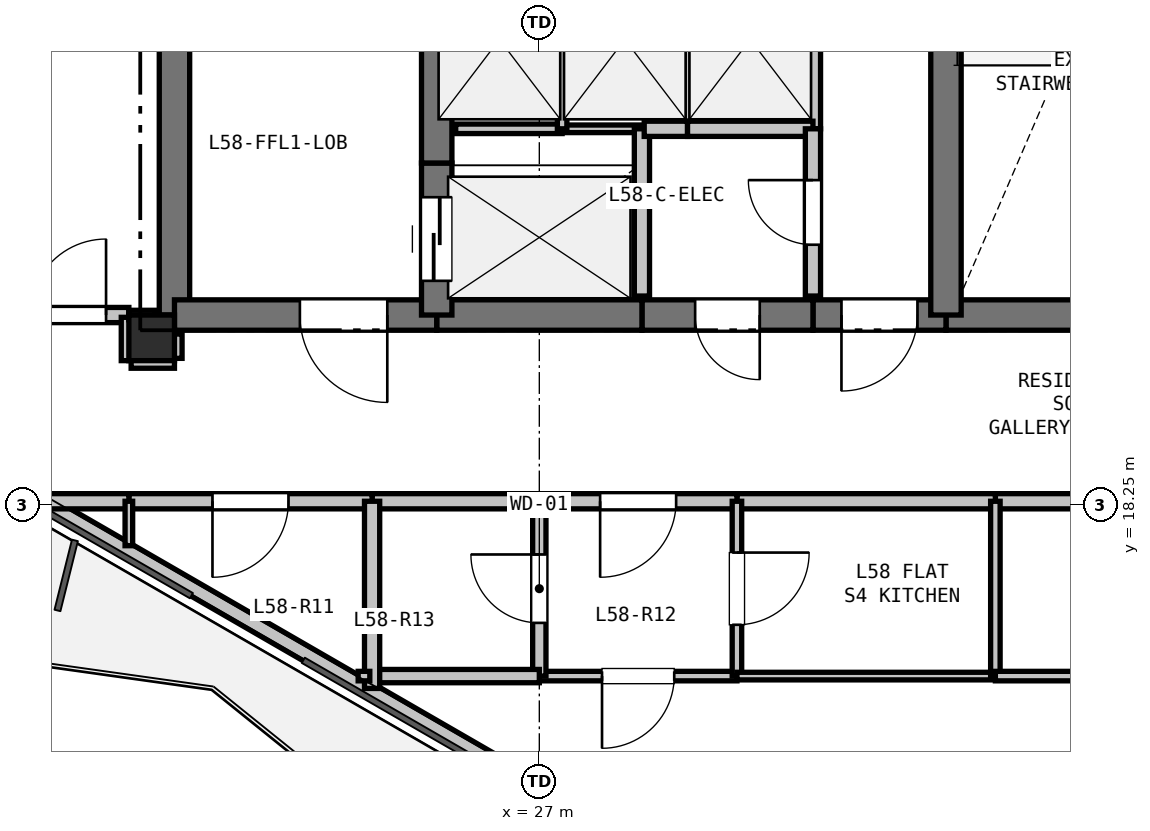
"""IFC4 building model, lengths in metres.
Left out: names, types, materials, properties, quantities, classifications, styles, units other than length and angle.
Written with IfcOpenShell. Run it as: python <this file> out.ifc"""

import sys

from ifc_helpers import new_model, si_unit, direction, frame, frame_2d, origin, origin_2d, place, context, subcontext, project, spatial, rectangle, extrude, element, fill, save


model = new_model("IFC4")
c1 = context("Model", 3, precision=1e-05, world=origin(), true_north=direction((0.0, 1.0)))
c2 = subcontext(c1, "Body", "Model", "MODEL_VIEW")
j1 = project(units=[si_unit("LENGTHUNIT", "METRE"), si_unit("PLANEANGLEUNIT", "RADIAN")], contexts=[c1])
p1 = place(None, origin())
s1 = spatial("IfcSite", under=j1, at=p1, CompositionType="ELEMENT")
p2 = place(p1, origin())
s2 = spatial("IfcBuilding", under=s1, at=p2, CompositionType="ELEMENT")
p3 = place(p2, frame((0.0, 0.0, 208.5)))
s3 = spatial("IfcBuildingStorey", under=s2, at=p3, CompositionType="ELEMENT", Elevation=208.5)
p4 = place(p3, frame((21.9, 20.45, 0.0), z_axis=(0.0, 0.0, 1.0), x_axis=(1.0, 0.0, 0.0)))
e1 = element("IfcColumn", 1, at=p4, inside=s3, PredefinedType="COLUMN", context=c2, shape_type="SweptSolid", body=[
    extrude(rectangle(XDim=0.6, YDim=0.6, at=origin_2d()), origin(), (0.0, 0.0, 1.0), 3.3),
])
p5 = place(p3, frame((27.102, 14.464, 0.0), z_axis=(0.0, 0.0, 1.0), x_axis=(-0.866020680503, 0.500008180874, 0.0)))
e2 = element("IfcWall", 2, at=p5, inside=s3, PredefinedType="PARAPET", context=c2, shape_type="SweptSolid", body=[
    extrude(rectangle(XDim=8.999, YDim=0.2, at=frame_2d((4.5, 0.0))), origin(), (0.0, 0.0, 1.0), 0.2),
])
p6 = place(p3, frame((22.2, 20.75, 0.0), z_axis=(0.0, 0.0, 1.0), x_axis=(0.0, 1.0, 0.0)))
e3 = element("IfcWall", 3, at=p6, inside=s3, PredefinedType="SHEAR", context=c2, shape_type="SweptSolid", body=[
    extrude(rectangle(XDim=4.65, YDim=0.4, at=frame_2d((2.325, 0.0))), origin(), (0.0, 0.0, 1.0), 3.07),
])
p7 = place(p3, frame((35.8, 20.75, 0.0), z_axis=(0.0, 0.0, 1.0), x_axis=(-1.0, 0.0, 0.0)))
e4 = element("IfcWall", 4, at=p7, inside=s3, PredefinedType="SHEAR", context=c2, shape_type="SweptSolid", body=[
    extrude(rectangle(XDim=3.45, YDim=0.4, at=frame_2d((1.725, 0.0))), origin(), (0.0, 0.0, 1.0), 3.07),
])
p8 = place(p3, frame((32.35, 20.75, 0.0), z_axis=(0.0, 0.0, 1.0), x_axis=(-1.0, 0.0, 0.0)))
e5 = element("IfcWall", 5, at=p8, inside=s3, PredefinedType="SHEAR", context=c2, shape_type="SweptSolid", body=[
    extrude(rectangle(XDim=1.75, YDim=0.4, at=frame_2d((0.875, 0.0))), origin(), (0.0, 0.0, 1.0), 3.07),
])
p9 = place(p8, frame((0.375, 0.0, 0.0)))
e6 = element("IfcOpeningElement", 6, at=p9, cuts=e5, PredefinedType="OPENING", context=c2, shape_type="SweptSolid", body=[
    extrude(rectangle(XDim=1.0, YDim=2.15, at=frame_2d((0.5, 1.075))), frame((0.0, 0.21, 0.0), z_axis=(0.0, -1.0, 0.0), x_axis=(1.0, 0.0, 0.0)), (0.0, 0.0, 1.0), 0.42),
])
p10 = place(p3, frame((30.6, 20.75, 0.0), z_axis=(0.0, 0.0, 1.0), x_axis=(-1.0, 0.0, 0.0)))
e7 = element("IfcWall", 7, at=p10, inside=s3, PredefinedType="SHEAR", context=c2, shape_type="SweptSolid", body=[
    extrude(rectangle(XDim=2.25, YDim=0.4, at=frame_2d((1.125, 0.0))), origin(), (0.0, 0.0, 1.0), 3.07),
])
p11 = place(p10, frame((0.7, 0.0, 0.0)))
e8 = element("IfcOpeningElement", 8, at=p11, cuts=e7, PredefinedType="OPENING", context=c2, shape_type="SweptSolid", body=[
    extrude(rectangle(XDim=0.85, YDim=2.1, at=frame_2d((0.425, 1.05))), frame((0.0, 0.21, 0.0), z_axis=(0.0, -1.0, 0.0), x_axis=(1.0, 0.0, 0.0)), (0.0, 0.0, 1.0), 0.42),
])
p12 = place(p3, frame((28.35, 20.75, 0.0), z_axis=(0.0, 0.0, 1.0), x_axis=(-1.0, 0.0, 0.0)))
e9 = element("IfcWall", 9, at=p12, inside=s3, PredefinedType="SHEAR", context=c2, shape_type="SweptSolid", body=[
    extrude(rectangle(XDim=2.7, YDim=0.4, at=frame_2d((1.35, 0.0))), origin(), (0.0, 0.0, 1.0), 3.07),
])
p13 = place(p3, frame((25.65, 20.75, 0.0), z_axis=(0.0, 0.0, 1.0), x_axis=(-1.0, 0.0, 0.0)))
e10 = element("IfcWall", 10, at=p13, inside=s3, PredefinedType="SHEAR", context=c2, shape_type="SweptSolid", body=[
    extrude(rectangle(XDim=3.45, YDim=0.4, at=frame_2d((1.725, 0.0))), origin(), (0.0, 0.0, 1.0), 3.07),
])
p14 = place(p13, frame((0.65, 0.0, 0.0)))
e11 = element("IfcOpeningElement", 11, at=p14, cuts=e10, PredefinedType="OPENING", context=c2, shape_type="SweptSolid", body=[
    extrude(rectangle(XDim=1.15, YDim=2.15, at=frame_2d((0.575, 1.075))), frame((0.0, 0.21, 0.0), z_axis=(0.0, -1.0, 0.0), x_axis=(1.0, 0.0, 0.0)), (0.0, 0.0, 1.0), 0.42),
])
p15 = place(p3, frame((25.65, 20.75, 0.0), z_axis=(0.0, 0.0, 1.0), x_axis=(0.0, 1.0, 0.0)))
e12 = element("IfcWall", 12, at=p15, inside=s3, PredefinedType="SHEAR", context=c2, shape_type="SweptSolid", body=[
    extrude(rectangle(XDim=2.0, YDim=0.4, at=frame_2d((1.0, 0.0))), origin(), (0.0, 0.0, 1.0), 3.07),
])
p16 = place(p15, frame((0.45, 0.0, 0.0)))
e13 = element("IfcOpeningElement", 13, at=p16, cuts=e12, PredefinedType="OPENING", context=c2, shape_type="SweptSolid", body=[
    extrude(rectangle(XDim=1.1, YDim=2.15, at=frame_2d((0.55, 1.075))), frame((0.0, 0.21, 0.0), z_axis=(0.0, -1.0, 0.0), x_axis=(1.0, 0.0, 0.0)), (0.0, 0.0, 1.0), 0.42),
])
p17 = place(p3, frame((25.65, 22.75, 0.0), z_axis=(0.0, 0.0, 1.0), x_axis=(0.0, 1.0, 0.0)))
e14 = element("IfcWall", 14, at=p17, inside=s3, PredefinedType="SHEAR", context=c2, shape_type="SweptSolid", body=[
    extrude(rectangle(XDim=2.8, YDim=0.4, at=frame_2d((1.4, 0.0))), origin(), (0.0, 0.0, 1.0), 3.07),
])
p18 = place(p3, frame((32.35, 20.75, 0.0), z_axis=(0.0, 0.0, 1.0), x_axis=(0.0, 1.0, 0.0)))
e15 = element("IfcWall", 15, at=p18, inside=s3, PredefinedType="SHEAR", context=c2, shape_type="SweptSolid", body=[
    extrude(rectangle(XDim=4.8, YDim=0.4, at=frame_2d((2.4, 0.0))), origin(), (0.0, 0.0, 1.0), 3.07),
])
p19 = place(p3, frame((25.9, 23.2, 0.0), z_axis=(0.0, 0.0, 1.0), x_axis=(1.0, 0.0, 0.0)))
e16 = element("IfcWall", 16, at=p19, inside=s3, PredefinedType="PARTITIONING", context=c2, shape_type="SweptSolid", body=[
    extrude(rectangle(XDim=1.4, YDim=0.125, at=frame_2d((0.7, 0.0))), origin(), (0.0, 0.0, 1.0), 3.07),
])
p20 = place(p3, frame((27.3, 23.2, 0.0), z_axis=(0.0, 0.0, 1.0), x_axis=(1.0, 0.0, 0.0)))
e17 = element("IfcWall", 17, at=p20, inside=s3, PredefinedType="PARTITIONING", context=c2, shape_type="SweptSolid", body=[
    extrude(rectangle(XDim=1.05, YDim=0.1, at=frame_2d((0.525, 0.0))), origin(), (0.0, 0.0, 1.0), 3.07),
])
p21 = place(p3, frame((28.35, 23.2, 0.0), z_axis=(0.0, 0.0, 1.0), x_axis=(0.0, -1.0, 0.0)))
e18 = element("IfcWall", 18, at=p21, inside=s3, PredefinedType="PARTITIONING", context=c2, shape_type="SweptSolid", body=[
    extrude(rectangle(XDim=2.2, YDim=0.2, at=frame_2d((1.1, 0.0))), origin(), (0.0, 0.0, 1.0), 3.07),
])
p22 = place(p3, frame((27.3, 25.4, 0.0), z_axis=(0.0, 0.0, 1.0), x_axis=(0.0, -1.0, 0.0)))
e19 = element("IfcWall", 19, at=p22, inside=s3, PredefinedType="PARTITIONING", context=c2, shape_type="SweptSolid", body=[
    extrude(rectangle(XDim=2.2, YDim=0.125, at=frame_2d((1.1, 0.0))), origin(), (0.0, 0.0, 1.0), 3.07),
])
p23 = place(p3, frame((28.95, 25.4, 0.0), z_axis=(0.0, 0.0, 1.0), x_axis=(0.0, -1.0, 0.0)))
e20 = element("IfcWall", 20, at=p23, inside=s3, PredefinedType="PARTITIONING", context=c2, shape_type="SweptSolid", body=[
    extrude(rectangle(XDim=2.2, YDim=0.1, at=frame_2d((1.1, 0.0))), origin(), (0.0, 0.0, 1.0), 3.07),
])
p24 = place(p3, frame((28.95, 23.2, 0.0), z_axis=(0.0, 0.0, 1.0), x_axis=(-1.0, 0.0, 0.0)))
e21 = element("IfcWall", 21, at=p24, inside=s3, PredefinedType="PARTITIONING", context=c2, shape_type="SweptSolid", body=[
    extrude(rectangle(XDim=0.57, YDim=0.2, at=frame_2d((0.285, 0.0))), origin(), (0.0, 0.0, 1.0), 3.07),
])
p25 = place(p3, frame((30.6, 25.4, 0.0), z_axis=(0.0, 0.0, 1.0), x_axis=(0.0, -1.0, 0.0)))
e22 = element("IfcWall", 22, at=p25, inside=s3, PredefinedType="PARTITIONING", context=c2, shape_type="SweptSolid", body=[
    extrude(rectangle(XDim=2.2, YDim=0.2, at=frame_2d((1.1, 0.0))), origin(), (0.0, 0.0, 1.0), 3.07),
])
p26 = place(p3, frame((30.6, 23.2, 0.0), z_axis=(0.0, 0.0, 1.0), x_axis=(-1.0, 0.0, 0.0)))
e23 = element("IfcWall", 23, at=p26, inside=s3, PredefinedType="PARTITIONING", context=c2, shape_type="SweptSolid", body=[
    extrude(rectangle(XDim=1.65, YDim=0.2, at=frame_2d((0.825, 0.0))), origin(), (0.0, 0.0, 1.0), 3.07),
])
p27 = place(p3, frame((30.6, 21.0, 0.0), z_axis=(0.0, 0.0, 1.0), x_axis=(0.0, 1.0, 0.0)))
e24 = element("IfcWall", 24, at=p27, inside=s3, PredefinedType="PARTITIONING", context=c2, shape_type="SweptSolid", body=[
    extrude(rectangle(XDim=2.2, YDim=0.2, at=frame_2d((1.1, 0.0))), origin(), (0.0, 0.0, 1.0), 3.07),
])
p28 = place(p27, frame((0.675, 0.0, 0.0)))
e25 = element("IfcOpeningElement", 25, at=p28, cuts=e24, PredefinedType="OPENING", context=c2, shape_type="SweptSolid", body=[
    extrude(rectangle(XDim=0.85, YDim=2.1, at=frame_2d((0.425, 1.05))), frame((0.0, 0.11, 0.0), z_axis=(0.0, -1.0, 0.0), x_axis=(1.0, 0.0, 0.0)), (0.0, 0.0, 1.0), 0.22),
])
p29 = place(p3, frame((20.0, 20.75, 0.0), z_axis=(0.0, 0.0, 1.0), x_axis=(1.0, 0.0, 0.0)))
e26 = element("IfcWall", 26, at=p29, inside=s3, PredefinedType="PARTITIONING", context=c2, shape_type="SweptSolid", body=[
    extrude(rectangle(XDim=1.6, YDim=0.2, at=frame_2d((0.8, 0.0))), origin(), (0.0, 0.0, 1.0), 2.518),
])
p30 = place(p29, frame((0.3, 0.0, 0.0)))
e27 = element("IfcOpeningElement", 27, at=p30, cuts=e26, PredefinedType="OPENING", context=c2, shape_type="SweptSolid", body=[
    extrude(rectangle(XDim=1.0, YDim=2.15, at=frame_2d((0.5, 1.075))), frame((0.0, 0.11, 0.0), z_axis=(0.0, -1.0, 0.0), x_axis=(1.0, 0.0, 0.0)), (0.0, 0.0, 1.0), 0.22),
])
for number, where, z_axis, x_axis in (
    (28, (21.6, 20.72, 0.0), (0.0, 0.0, 1.0), (0.0, -1.0, 0.0)),
    (29, (21.63, 20.15, 0.0), (0.0, 0.0, 1.0), (1.0, 0.0, 0.0)),
):
    element("IfcWall", number, at=place(p3, frame(where, z_axis=z_axis, x_axis=x_axis)), inside=s3, PredefinedType="PARTITIONING", context=c2, shape_type="SweptSolid", body=[
        extrude(rectangle(XDim=0.57, YDim=0.2, at=frame_2d((0.285, 0.0))), origin(), (0.0, 0.0, 1.0), 2.518),
    ])
p31 = place(p3, frame((22.2, 20.18, 0.0), z_axis=(0.0, 0.0, 1.0), x_axis=(0.0, 1.0, 0.0)))
e30 = element("IfcWall", 30, at=p31, inside=s3, PredefinedType="PARTITIONING", context=c2, shape_type="SweptSolid", body=[
    extrude(rectangle(XDim=0.32, YDim=0.2, at=frame_2d((0.16, 0.0))), origin(), (0.0, 0.0, 1.0), 2.518),
])
p32 = place(p3, frame((34.5, 18.3, 0.0), z_axis=(0.0, 0.0, 1.0), x_axis=(-1.0, 0.0, 0.0)))
e31 = element("IfcWall", 31, at=p32, inside=s3, PredefinedType="PARTITIONING", context=c2, shape_type="SweptSolid", body=[
    extrude(rectangle(XDim=1.5, YDim=0.2, at=frame_2d((0.75, 0.0))), origin(), (0.0, 0.0, 1.0), 3.07),
])
p33 = place(p3, frame((33.0, 18.3, 0.0), z_axis=(0.0, 0.0, 1.0), x_axis=(-1.0, 0.0, 0.0)))
e32 = element("IfcWall", 32, at=p33, inside=s3, PredefinedType="PARTITIONING", context=c2, shape_type="SweptSolid", body=[
    extrude(rectangle(XDim=3.4, YDim=0.2, at=frame_2d((1.7, 0.0))), origin(), (0.0, 0.0, 1.0), 3.07),
])
p34 = place(p3, frame((29.6, 18.3, 0.0), z_axis=(0.0, 0.0, 1.0), x_axis=(-1.0, 0.0, 0.0)))
e33 = element("IfcWall", 33, at=p34, inside=s3, PredefinedType="PARTITIONING", context=c2, shape_type="SweptSolid", body=[
    extrude(rectangle(XDim=2.6, YDim=0.2, at=frame_2d((1.3, 0.0))), origin(), (0.0, 0.0, 1.0), 3.07),
])
p35 = place(p34, frame((0.8, 0.0, 0.0)))
e34 = element("IfcOpeningElement", 34, at=p35, cuts=e33, PredefinedType="OPENING", context=c2, shape_type="SweptSolid", body=[
    extrude(rectangle(XDim=1.0, YDim=2.15, at=frame_2d((0.5, 1.075))), frame((0.0, 0.11, 0.0), z_axis=(0.0, -1.0, 0.0), x_axis=(1.0, 0.0, 0.0)), (0.0, 0.0, 1.0), 0.22),
])
p36 = place(p3, frame((27.0, 18.3, 0.0), z_axis=(0.0, 0.0, 1.0), x_axis=(-1.0, 0.0, 0.0)))
e35 = element("IfcWall", 35, at=p36, inside=s3, PredefinedType="PARTITIONING", context=c2, shape_type="SweptSolid", body=[
    extrude(rectangle(XDim=2.2, YDim=0.2, at=frame_2d((1.1, 0.0))), origin(), (0.0, 0.0, 1.0), 2.518),
])
p37 = place(p3, frame((24.8, 18.3, 0.0), z_axis=(0.0, 0.0, 1.0), x_axis=(-1.0, 0.0, 0.0)))
e36 = element("IfcWall", 36, at=p37, inside=s3, PredefinedType="PARTITIONING", context=c2, shape_type="SweptSolid", body=[
    extrude(rectangle(XDim=3.2, YDim=0.2, at=frame_2d((1.6, 0.0))), origin(), (0.0, 0.0, 1.0), 2.365),
])
p38 = place(p37, frame((1.1, 0.0, 0.0)))
e37 = element("IfcOpeningElement", 37, at=p38, cuts=e36, PredefinedType="OPENING", context=c2, shape_type="SweptSolid", body=[
    extrude(rectangle(XDim=1.0, YDim=2.15, at=frame_2d((0.5, 1.075))), frame((0.0, 0.11, 0.0), z_axis=(0.0, -1.0, 0.0), x_axis=(1.0, 0.0, 0.0)), (0.0, 0.0, 1.0), 0.22),
])
p39 = place(p3, frame((21.6, 18.3, 0.0), z_axis=(0.0, 0.0, 1.0), x_axis=(-1.0, 0.0, 0.0)))
e38 = element("IfcWall", 38, at=p39, inside=s3, PredefinedType="PARTITIONING", context=c2, shape_type="SweptSolid", body=[
    extrude(rectangle(XDim=1.072, YDim=0.2, at=frame_2d((0.536, 0.0))), origin(), (0.0, 0.0, 1.0), 2.365),
])
p40 = place(p3, frame((29.6, 16.0, 0.0), z_axis=(0.0, 0.0, 1.0), x_axis=(-1.0, 0.0, 0.0)))
e39 = element("IfcWall", 39, at=p40, inside=s3, PredefinedType="PARTITIONING", context=c2, shape_type="SweptSolid", body=[
    extrude(rectangle(XDim=2.6, YDim=0.125, at=frame_2d((1.3, 0.0))), origin(), (0.0, 0.0, 1.0), 2.518),
])
p41 = place(p40, frame((0.825, 0.0, 0.0)))
e40 = element("IfcOpeningElement", 40, at=p41, cuts=e39, PredefinedType="OPENING", context=c2, shape_type="SweptSolid", body=[
    extrude(rectangle(XDim=0.95, YDim=2.1, at=frame_2d((0.475, 1.05))), frame((0.0, 0.073, 0.0), z_axis=(0.0, -1.0, 0.0), x_axis=(1.0, 0.0, 0.0)), (0.0, 0.0, 1.0), 0.145),
])
p42 = place(p3, frame((27.0, 16.0, 0.0), z_axis=(0.0, 0.0, 1.0), x_axis=(0.0, 1.0, 0.0)))
e41 = element("IfcWall", 41, at=p42, inside=s3, PredefinedType="PLUMBINGWALL", context=c2, shape_type="SweptSolid", body=[
    extrude(rectangle(XDim=2.3, YDim=0.175, at=frame_2d((1.15, 0.0))), origin(), (0.0, 0.0, 1.0), 2.518),
])
p43 = place(p42, frame((0.7, 0.0, 0.0)))
e42 = element("IfcOpeningElement", 42, at=p43, cuts=e41, PredefinedType="OPENING", context=c2, shape_type="SweptSolid", body=[
    extrude(rectangle(XDim=0.9, YDim=2.1, at=frame_2d((0.45, 1.05))), frame((0.0, 0.097, 0.0), z_axis=(0.0, -1.0, 0.0), x_axis=(1.0, 0.0, 0.0)), (0.0, 0.0, 1.0), 0.195),
])
p44 = place(p3, frame((29.6, 18.3, 0.0), z_axis=(0.0, 0.0, 1.0), x_axis=(0.0, -1.0, 0.0)))
e43 = element("IfcWall", 43, at=p44, inside=s3, PredefinedType="PARTITIONING", context=c2, shape_type="SweptSolid", body=[
    extrude(rectangle(XDim=2.3, YDim=0.125, at=frame_2d((1.15, 0.0))), origin(), (0.0, 0.0, 1.0), 3.07),
])
p45 = place(p44, frame((0.675, 0.0, 0.0)))
e44 = element("IfcOpeningElement", 44, at=p45, cuts=e43, PredefinedType="OPENING", context=c2, shape_type="SweptSolid", body=[
    extrude(rectangle(XDim=0.95, YDim=2.1, at=frame_2d((0.475, 1.05))), frame((0.0, 0.073, 0.0), z_axis=(0.0, -1.0, 0.0), x_axis=(1.0, 0.0, 0.0)), (0.0, 0.0, 1.0), 0.145),
])
p46 = place(p3, frame((27.0, 16.0, 0.0), z_axis=(0.0, 0.0, 1.0), x_axis=(-1.0, 0.0, 0.0)))
e45 = element("IfcWall", 45, at=p46, inside=s3, PredefinedType="PLUMBINGWALL", context=c2, shape_type="SweptSolid", body=[
    extrude(rectangle(XDim=2.2, YDim=0.175, at=frame_2d((1.1, 0.0))), origin(), (0.0, 0.0, 1.0), 2.365),
])
p47 = place(p3, frame((24.8, 15.838, 0.0), z_axis=(0.0, 0.0, 1.0), x_axis=(0.0, 1.0, 0.0)))
e46 = element("IfcWall", 46, at=p47, inside=s3, PredefinedType="PARTITIONING", context=c2, shape_type="SweptSolid", body=[
    extrude(rectangle(XDim=2.462, YDim=0.2, at=frame_2d((1.231, 0.0))), origin(), (0.0, 0.0, 1.0), 2.365),
])
p48 = place(p3, frame((33.0, 16.0, 0.0), z_axis=(0.0, 0.0, 1.0), x_axis=(-1.0, 0.0, 0.0)))
e47 = element("IfcWall", 47, at=p48, inside=s3, PredefinedType="PARTITIONING", context=c2, shape_type="SweptSolid", body=[
    extrude(rectangle(XDim=3.4, YDim=0.1, at=frame_2d((1.7, 0.0))), origin(), (0.0, 0.0, 1.0), 3.07),
])
p49 = place(p3, frame((33.0, 18.3, 0.0), z_axis=(0.0, 0.0, 1.0), x_axis=(0.0, -1.0, 0.0)))
e48 = element("IfcWall", 48, at=p49, inside=s3, PredefinedType="PARTITIONING", context=c2, shape_type="SweptSolid", body=[
    extrude(rectangle(XDim=2.3, YDim=0.125, at=frame_2d((1.15, 0.0))), origin(), (0.0, 0.0, 1.0), 3.07),
])
p50 = place(p3, frame((21.95, 20.75, 0.0), z_axis=(0.0, 0.0, 1.0), x_axis=(-1.0, 0.0, 0.0)))
e49 = element("IfcWall", 49, at=p50, inside=s3, PredefinedType="PARTITIONING", context=c2, shape_type="SweptSolid", body=[
    extrude(rectangle(XDim=0.35, YDim=0.125, at=frame_2d((0.175, 0.0))), origin(), (0.0, 0.0, 1.0), 2.595),
])
p51 = place(p3, frame((24.77, 16.0, 0.0), z_axis=(0.0, 0.0, 1.0), x_axis=(-1.0, 0.0, 0.0)))
e50 = element("IfcWall", 50, at=p51, inside=s3, PredefinedType="PARTITIONING", context=c2, shape_type="SweptSolid", body=[
    extrude(rectangle(XDim=0.153, YDim=0.125, at=frame_2d((0.077, 0.0))), origin(), (0.0, 0.0, 1.0), 3.07),
])
p52 = place(p3, frame((21.6, 17.715, 0.0), z_axis=(0.0, 0.0, 1.0), x_axis=(0.0, 1.0, 0.0)))
e51 = element("IfcWall", 51, at=p52, inside=s3, PredefinedType="PARTITIONING", context=c2, shape_type="SweptSolid", body=[
    extrude(rectangle(XDim=0.585, YDim=0.1, at=frame_2d((0.292, 0.0))), origin(), (0.0, 0.0, 1.0), 2.365),
])
p53 = place(p3, frame((33.0, 16.0, 0.0), z_axis=(0.0, 0.0, 1.0), x_axis=(1.0, 0.0, 0.0)))
e52 = element("IfcWall", 52, at=p53, inside=s3, PredefinedType="PARTITIONING", context=c2, shape_type="SweptSolid", body=[
    extrude(rectangle(XDim=1.5, YDim=0.125, at=frame_2d((0.75, 0.0))), origin(), (0.0, 0.0, 1.0), 3.07),
])
p54 = place(p9, origin())
e53 = element("IfcDoor", 53, at=p54, inside=s3, OperationType="SINGLE_SWING_RIGHT", PredefinedType="DOOR", context=c2, shape_type="SweptSolid", body=[
    extrude(rectangle(XDim=1.0, YDim=2.15, at=frame_2d((0.5, 1.075))), frame((0.0, 0.025, 0.0), z_axis=(0.0, -1.0, 0.0), x_axis=(1.0, 0.0, 0.0)), (0.0, 0.0, 1.0), 0.05),
])
fill(e6, e53)
p55 = place(p16, origin())
e54 = element("IfcDoor", 54, at=p55, inside=s3, OperationType="SLIDING_TO_LEFT", PredefinedType="DOOR", context=c2, shape_type="SweptSolid", body=[
    extrude(rectangle(XDim=1.1, YDim=2.15, at=frame_2d((0.55, 1.075))), frame((0.0, 0.025, 0.0), z_axis=(0.0, -1.0, 0.0), x_axis=(1.0, 0.0, 0.0)), (0.0, 0.0, 1.0), 0.05),
])
fill(e13, e54)
p56 = place(p14, origin())
e55 = element("IfcDoor", 55, at=p56, inside=s3, OperationType="SINGLE_SWING_LEFT", PredefinedType="DOOR", context=c2, shape_type="SweptSolid", body=[
    extrude(rectangle(XDim=1.15, YDim=2.15, at=frame_2d((0.575, 1.075))), frame((0.0, 0.025, 0.0), z_axis=(0.0, -1.0, 0.0), x_axis=(1.0, 0.0, 0.0)), (0.0, 0.0, 1.0), 0.05),
])
fill(e11, e55)
p57 = place(p28, origin())
e56 = element("IfcDoor", 56, at=p57, inside=s3, OperationType="SINGLE_SWING_RIGHT", PredefinedType="DOOR", context=c2, shape_type="SweptSolid", body=[
    extrude(rectangle(XDim=0.85, YDim=2.1, at=frame_2d((0.425, 1.05))), frame((0.0, 0.025, 0.0), z_axis=(0.0, -1.0, 0.0), x_axis=(1.0, 0.0, 0.0)), (0.0, 0.0, 1.0), 0.05),
])
fill(e25, e56)
p58 = place(p35, origin())
e57 = element("IfcDoor", 57, at=p58, inside=s3, OperationType="SINGLE_SWING_RIGHT", PredefinedType="DOOR", context=c2, shape_type="SweptSolid", body=[
    extrude(rectangle(XDim=1.0, YDim=2.15, at=frame_2d((0.5, 1.075))), frame((0.0, 0.025, 0.0), z_axis=(0.0, -1.0, 0.0), x_axis=(1.0, 0.0, 0.0)), (0.0, 0.0, 1.0), 0.05),
])
fill(e34, e57)
p59 = place(p11, origin())
e58 = element("IfcDoor", 58, at=p59, inside=s3, OperationType="SINGLE_SWING_LEFT", PredefinedType="DOOR", context=c2, shape_type="SweptSolid", body=[
    extrude(rectangle(XDim=0.85, YDim=2.1, at=frame_2d((0.425, 1.05))), frame((0.0, 0.025, 0.0), z_axis=(0.0, -1.0, 0.0), x_axis=(1.0, 0.0, 0.0)), (0.0, 0.0, 1.0), 0.05),
])
fill(e8, e58)
p60 = place(p30, origin())
e59 = element("IfcDoor", 59, at=p60, inside=s3, OperationType="SINGLE_SWING_RIGHT", PredefinedType="DOOR", context=c2, shape_type="SweptSolid", body=[
    extrude(rectangle(XDim=1.0, YDim=2.15, at=frame_2d((0.5, 1.075))), frame((0.0, 0.025, 0.0), z_axis=(0.0, -1.0, 0.0), x_axis=(1.0, 0.0, 0.0)), (0.0, 0.0, 1.0), 0.05),
])
fill(e27, e59)
p61 = place(p38, origin())
e60 = element("IfcDoor", 60, at=p61, inside=s3, OperationType="SINGLE_SWING_RIGHT", PredefinedType="DOOR", context=c2, shape_type="SweptSolid", body=[
    extrude(rectangle(XDim=1.0, YDim=2.15, at=frame_2d((0.5, 1.075))), frame((0.0, 0.025, 0.0), z_axis=(0.0, -1.0, 0.0), x_axis=(1.0, 0.0, 0.0)), (0.0, 0.0, 1.0), 0.05),
])
fill(e37, e60)
p62 = place(p43, origin())
e61 = element("IfcDoor", 61, at=p62, inside=s3, OperationType="SINGLE_SWING_RIGHT", PredefinedType="DOOR", context=c2, shape_type="SweptSolid", body=[
    extrude(rectangle(XDim=0.9, YDim=2.1, at=frame_2d((0.45, 1.05))), frame((0.0, 0.025, 0.0), z_axis=(0.0, -1.0, 0.0), x_axis=(1.0, 0.0, 0.0)), (0.0, 0.0, 1.0), 0.05),
])
fill(e42, e61)
p63 = place(p45, origin())
e62 = element("IfcDoor", 62, at=p63, inside=s3, OperationType="SINGLE_SWING_LEFT", PredefinedType="DOOR", context=c2, shape_type="SweptSolid", body=[
    extrude(rectangle(XDim=0.95, YDim=2.1, at=frame_2d((0.475, 1.05))), frame((0.0, 0.025, 0.0), z_axis=(0.0, -1.0, 0.0), x_axis=(1.0, 0.0, 0.0)), (0.0, 0.0, 1.0), 0.05),
])
fill(e44, e62)
p64 = place(p41, origin())
e63 = element("IfcDoor", 63, at=p64, inside=s3, OperationType="SINGLE_SWING_RIGHT", PredefinedType="DOOR", context=c2, shape_type="SweptSolid", body=[
    extrude(rectangle(XDim=0.95, YDim=2.1, at=frame_2d((0.475, 1.05))), frame((0.0, 0.025, 0.0), z_axis=(0.0, -1.0, 0.0), x_axis=(1.0, 0.0, 0.0)), (0.0, 0.0, 1.0), 0.05),
])
fill(e40, e63)
save(model, sys.argv[1])
